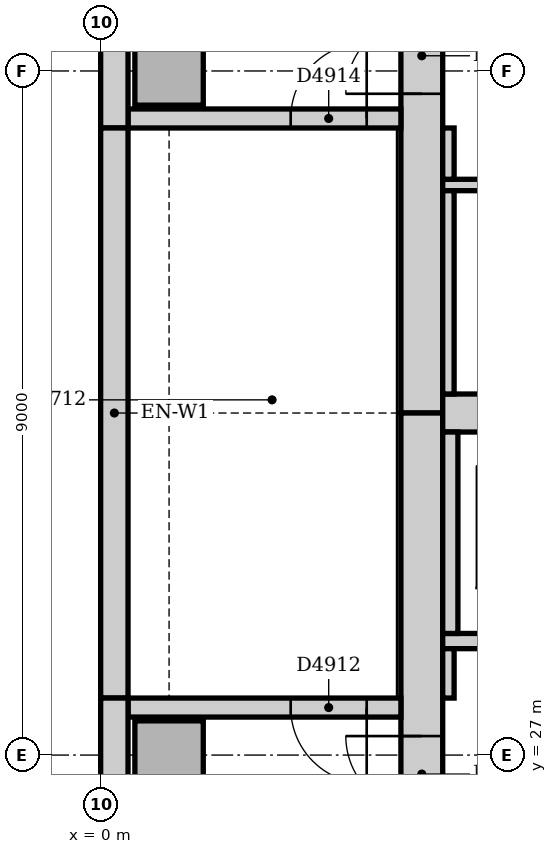
"""IFC4 building model, lengths in metres.
Left out: names, types, materials, properties, quantities, classifications, styles, units other than length and angle.
Written with IfcOpenShell. Run it as: python <this file> out.ifc"""

import sys

from ifc_helpers import new_model, si_unit, direction, frame, frame_2d, origin, origin_2d, place, context, subcontext, project, spatial, rectangle, extrude, element, fill, save


model = new_model("IFC4")
c1 = context("Model", 3, precision=1e-05, world=origin(), true_north=direction((0.0, 1.0)))
c2 = subcontext(c1, "Body", "Model", "MODEL_VIEW")
j1 = project(units=[si_unit("LENGTHUNIT", "METRE"), si_unit("PLANEANGLEUNIT", "RADIAN")], contexts=[c1])
p1 = place(None, origin())
s1 = spatial("IfcSite", under=j1, at=p1, CompositionType="ELEMENT")
p2 = place(p1, origin())
s2 = spatial("IfcBuilding", under=s1, at=p2, CompositionType="ELEMENT")
p3 = place(p2, frame((0.0, 0.0, 198.0)))
s3 = spatial("IfcBuildingStorey", under=s2, at=p3, CompositionType="ELEMENT", Elevation=198.0)
p4 = place(p3, frame((4.225, 42.0, 0.0), z_axis=(0.0, 0.0, 1.0), x_axis=(0.0, -1.0, 0.0)))
e1 = element("IfcWall", 1, at=p4, inside=s3, PredefinedType="SOLIDWALL", context=c2, shape_type="SweptSolid", body=[
    extrude(rectangle(XDim=10.5, YDim=0.55, at=frame_2d((5.25, 0.0))), origin(), (0.0, 0.0, 1.0), 4.0),
])
p5 = place(p4, frame((5.3, 0.0, 0.0)))
e2 = element("IfcOpeningElement", 2, at=p5, cuts=e1, PredefinedType="OPENING", context=c2, shape_type="SweptSolid", body=[
    extrude(rectangle(XDim=1.0, YDim=2.1, at=frame_2d((0.5, 1.05))), frame((0.0, 0.285, 0.0), z_axis=(0.0, -1.0, 0.0), x_axis=(1.0, 0.0, 0.0)), (0.0, 0.0, 1.0), 0.57),
])
p6 = place(p3, frame((4.225, 31.5, 0.0), z_axis=(0.0, 0.0, 1.0), x_axis=(0.0, -1.0, 0.0)))
e3 = element("IfcWall", 3, at=p6, inside=s3, PredefinedType="SOLIDWALL", context=c2, shape_type="SweptSolid", body=[
    extrude(rectangle(XDim=10.5, YDim=0.55, at=frame_2d((5.25, 0.0))), origin(), (0.0, 0.0, 1.0), 4.0),
])
p7 = place(p6, frame((4.25, 0.0, 0.0)))
e4 = element("IfcOpeningElement", 4, at=p7, cuts=e3, PredefinedType="OPENING", context=c2, shape_type="SweptSolid", body=[
    extrude(rectangle(XDim=1.0, YDim=2.1, at=frame_2d((0.5, 1.05))), frame((0.0, 0.285, 0.0), z_axis=(0.0, -1.0, 0.0), x_axis=(1.0, 0.0, 0.0)), (0.0, 0.0, 1.0), 0.57),
])
p8 = place(p3, frame((4.5, 31.5, 0.0), z_axis=(0.0, 0.0, 1.0), x_axis=(1.0, 0.0, 0.0)))
e5 = element("IfcWall", 5, at=p8, inside=s3, PredefinedType="SOLIDWALL", context=c2, shape_type="SweptSolid", body=[
    extrude(rectangle(XDim=18.0, YDim=0.5, at=frame_2d((9.0, 0.0))), origin(), (0.0, 0.0, 1.0), 4.0),
])
p9 = place(p3, frame((3.95, 27.625, 0.0), z_axis=(0.0, 0.0, 1.0), x_axis=(-1.0, 0.0, 0.0)))
e6 = element("IfcWall", 6, at=p9, inside=s3, PredefinedType="SOLIDWALL", context=c2, shape_type="SweptSolid", body=[
    extrude(rectangle(XDim=3.59, YDim=0.25, at=frame_2d((1.795, 0.0))), origin(), (0.0, 0.0, 1.0), 4.0),
])
p10 = place(p9, frame((0.45, 0.0, 0.0)))
e7 = element("IfcOpeningElement", 7, at=p10, cuts=e6, PredefinedType="OPENING", context=c2, shape_type="SweptSolid", body=[
    extrude(rectangle(XDim=1.0, YDim=2.1, at=frame_2d((0.5, 1.05))), frame((0.0, 0.135, 0.0), z_axis=(0.0, -1.0, 0.0), x_axis=(1.0, 0.0, 0.0)), (0.0, 0.0, 1.0), 0.27),
])
p11 = place(p3, frame((0.36, 35.375, 0.0), z_axis=(0.0, 0.0, 1.0), x_axis=(1.0, 0.0, 0.0)))
e8 = element("IfcWall", 8, at=p11, inside=s3, PredefinedType="SOLIDWALL", context=c2, shape_type="SweptSolid", body=[
    extrude(rectangle(XDim=3.59, YDim=0.25, at=frame_2d((1.795, 0.0))), origin(), (0.0, 0.0, 1.0), 4.0),
])
p12 = place(p11, frame((2.14, 0.0, 0.0)))
e9 = element("IfcOpeningElement", 9, at=p12, cuts=e8, PredefinedType="OPENING", context=c2, shape_type="SweptSolid", body=[
    extrude(rectangle(XDim=1.0, YDim=2.1, at=frame_2d((0.5, 1.05))), frame((0.0, 0.135, 0.0), z_axis=(0.0, -1.0, 0.0), x_axis=(1.0, 0.0, 0.0)), (0.0, 0.0, 1.0), 0.27),
])
for number, where, z_axis, x_axis in (
    (10, (0.9, 27.0, 0.0), (0.0, 0.0, 1.0), (1.0, 0.0, 0.0)),
    (11, (0.9, 36.0, 0.0), (0.0, 0.0, 1.0), (1.0, 0.0, 0.0)),
):
    element("IfcColumn", number, at=place(p3, frame(where, z_axis=z_axis, x_axis=x_axis)), inside=s3, PredefinedType="COLUMN", context=c2, shape_type="SweptSolid", body=[
        extrude(rectangle(XDim=0.9, YDim=0.9, at=origin_2d()), origin(), (0.0, 0.0, 1.0), 4.0),
    ])
p13 = place(p3, frame((0.18, 42.0, 0.0), z_axis=(0.0, 0.0, 1.0), x_axis=(0.0, -1.0, 0.0)))
e12 = element("IfcWall", 12, at=p13, inside=s3, PredefinedType="STANDARD", context=c2, shape_type="SweptSolid", body=[
    extrude(rectangle(XDim=6.75, YDim=0.36, at=frame_2d((3.375, 0.0))), origin(), (0.0, 0.0, 1.0), 3.85),
])
p14 = place(p3, frame((0.18, 35.25, 0.0), z_axis=(0.0, 0.0, 1.0), x_axis=(0.0, -1.0, 0.0)))
e13 = element("IfcWall", 13, at=p14, inside=s3, PredefinedType="STANDARD", context=c2, shape_type="SweptSolid", body=[
    extrude(rectangle(XDim=7.5, YDim=0.36, at=frame_2d((3.75, 0.0))), origin(), (0.0, 0.0, 1.0), 3.85),
])
p15 = place(p3, frame((0.18, 27.75, 0.0), z_axis=(0.0, 0.0, 1.0), x_axis=(0.0, -1.0, 0.0)))
e14 = element("IfcWall", 14, at=p15, inside=s3, PredefinedType="STANDARD", context=c2, shape_type="SweptSolid", body=[
    extrude(rectangle(XDim=6.75, YDim=0.36, at=frame_2d((3.375, 0.0))), origin(), (0.0, 0.0, 1.0), 3.85),
])
p16 = place(p3, frame((4.5, 28.5, 0.0), z_axis=(0.0, 0.0, 1.0), x_axis=(1.0, 0.0, 0.0)))
e15 = element("IfcWall", 15, at=p16, inside=s3, PredefinedType="PARTITIONING", context=c2, shape_type="SweptSolid", body=[
    extrude(rectangle(XDim=18.0, YDim=0.2, at=frame_2d((9.0, 0.0))), origin(), (0.0, 0.0, 1.0), 3.85),
])
p17 = place(p16, frame((0.95, 0.0, 0.0)))
e16 = element("IfcOpeningElement", 16, at=p17, cuts=e15, PredefinedType="OPENING", context=c2, shape_type="SweptSolid", body=[
    extrude(rectangle(XDim=1.1, YDim=2.1, at=frame_2d((0.55, 1.05))), frame((0.0, 0.11, 0.0), z_axis=(0.0, -1.0, 0.0), x_axis=(1.0, 0.0, 0.0)), (0.0, 0.0, 1.0), 0.22),
])
p18 = place(p16, frame((3.95, 0.0, 0.0)))
e17 = element("IfcOpeningElement", 17, at=p18, cuts=e15, PredefinedType="OPENING", context=c2, shape_type="SweptSolid", body=[
    extrude(rectangle(XDim=1.1, YDim=2.1, at=frame_2d((0.55, 1.05))), frame((0.0, 0.11, 0.0), z_axis=(0.0, -1.0, 0.0), x_axis=(1.0, 0.0, 0.0)), (0.0, 0.0, 1.0), 0.22),
])
p19 = place(p16, frame((6.95, 0.0, 0.0)))
e18 = element("IfcOpeningElement", 18, at=p19, cuts=e15, PredefinedType="OPENING", context=c2, shape_type="SweptSolid", body=[
    extrude(rectangle(XDim=1.1, YDim=2.1, at=frame_2d((0.55, 1.05))), frame((0.0, 0.11, 0.0), z_axis=(0.0, -1.0, 0.0), x_axis=(1.0, 0.0, 0.0)), (0.0, 0.0, 1.0), 0.22),
])
p20 = place(p16, frame((9.95, 0.0, 0.0)))
e19 = element("IfcOpeningElement", 19, at=p20, cuts=e15, PredefinedType="OPENING", context=c2, shape_type="SweptSolid", body=[
    extrude(rectangle(XDim=1.1, YDim=2.1, at=frame_2d((0.55, 1.05))), frame((0.0, 0.11, 0.0), z_axis=(0.0, -1.0, 0.0), x_axis=(1.0, 0.0, 0.0)), (0.0, 0.0, 1.0), 0.22),
])
p21 = place(p16, frame((12.95, 0.0, 0.0)))
e20 = element("IfcOpeningElement", 20, at=p21, cuts=e15, PredefinedType="OPENING", context=c2, shape_type="SweptSolid", body=[
    extrude(rectangle(XDim=1.1, YDim=2.1, at=frame_2d((0.55, 1.05))), frame((0.0, 0.11, 0.0), z_axis=(0.0, -1.0, 0.0), x_axis=(1.0, 0.0, 0.0)), (0.0, 0.0, 1.0), 0.22),
])
p22 = place(p16, frame((15.95, 0.0, 0.0)))
e21 = element("IfcOpeningElement", 21, at=p22, cuts=e15, PredefinedType="OPENING", context=c2, shape_type="SweptSolid", body=[
    extrude(rectangle(XDim=1.1, YDim=2.1, at=frame_2d((0.55, 1.05))), frame((0.0, 0.11, 0.0), z_axis=(0.0, -1.0, 0.0), x_axis=(1.0, 0.0, 0.0)), (0.0, 0.0, 1.0), 0.22),
])
p23 = place(p3, frame((4.6, 28.6, 0.0), z_axis=(0.0, 0.0, 1.0), x_axis=(0.0, 1.0, 0.0)))
e22 = element("IfcWall", 22, at=p23, inside=s3, PredefinedType="PARTITIONING", context=c2, shape_type="SweptSolid", body=[
    extrude(rectangle(XDim=2.65, YDim=0.2, at=frame_2d((1.325, 0.0))), origin(), (0.0, 0.0, 1.0), 3.85),
])
p24 = place(p3, frame((4.5, 34.5, 0.0), z_axis=(0.0, 0.0, 1.0), x_axis=(1.0, 0.0, 0.0)))
e23 = element("IfcWall", 23, at=p24, inside=s3, PredefinedType="PARTITIONING", context=c2, shape_type="SweptSolid", body=[
    extrude(rectangle(XDim=5.9, YDim=0.15, at=frame_2d((2.95, 0.0))), origin(), (0.0, 0.0, 1.0), 3.85),
])
p25 = place(p24, frame((2.5, 0.0, 0.0)))
e24 = element("IfcOpeningElement", 24, at=p25, cuts=e23, PredefinedType="OPENING", context=c2, shape_type="SweptSolid", body=[
    extrude(rectangle(XDim=0.9, YDim=2.1, at=frame_2d((0.45, 1.05))), frame((0.0, 0.085, 0.0), z_axis=(0.0, -1.0, 0.0), x_axis=(1.0, 0.0, 0.0)), (0.0, 0.0, 1.0), 0.17),
])
p26 = place(p3, frame((4.575, 34.575, 0.0), z_axis=(0.0, 0.0, 1.0), x_axis=(0.0, 1.0, 0.0)))
e25 = element("IfcWall", 25, at=p26, inside=s3, PredefinedType="PARTITIONING", context=c2, shape_type="SweptSolid", body=[
    extrude(rectangle(XDim=0.675, YDim=0.15, at=frame_2d((0.338, 0.0))), origin(), (0.0, 0.0, 1.0), 3.85),
])
p27 = place(p3, frame((4.575, 31.75, 0.0), z_axis=(0.0, 0.0, 1.0), x_axis=(0.0, 1.0, 0.0)))
e26 = element("IfcWall", 26, at=p27, inside=s3, PredefinedType="PARTITIONING", context=c2, shape_type="SweptSolid", body=[
    extrude(rectangle(XDim=2.675, YDim=0.15, at=frame_2d((1.337, 0.0))), origin(), (0.0, 0.0, 1.0), 3.85),
])
p28 = place(p3, frame((4.575, 27.75, 0.0), z_axis=(0.0, 0.0, 1.0), x_axis=(0.0, 1.0, 0.0)))
e27 = element("IfcWall", 27, at=p28, inside=s3, PredefinedType="PARTITIONING", context=c2, shape_type="SweptSolid", body=[
    extrude(rectangle(XDim=0.65, YDim=0.15, at=frame_2d((0.325, 0.0))), origin(), (0.0, 0.0, 1.0), 3.85),
])
p29 = place(p7, frame((1.0, 0.0, 0.0), z_axis=(0.0, 0.0, 1.0), x_axis=(-1.0, 0.0, 0.0)))
e28 = element("IfcDoor", 28, at=p29, inside=s3, OperationType="SINGLE_SWING_RIGHT", PredefinedType="DOOR", context=c2, shape_type="SweptSolid", body=[
    extrude(rectangle(XDim=1.0, YDim=2.1, at=frame_2d((0.5, 1.05))), frame((0.0, 0.025, 0.0), z_axis=(0.0, -1.0, 0.0), x_axis=(1.0, 0.0, 0.0)), (0.0, 0.0, 1.0), 0.05),
])
fill(e4, e28)
p30 = place(p10, origin())
e29 = element("IfcDoor", 29, at=p30, inside=s3, OperationType="SINGLE_SWING_LEFT", PredefinedType="DOOR", context=c2, shape_type="SweptSolid", body=[
    extrude(rectangle(XDim=1.0, YDim=2.1, at=frame_2d((0.5, 1.05))), frame((0.0, 0.025, 0.0), z_axis=(0.0, -1.0, 0.0), x_axis=(1.0, 0.0, 0.0)), (0.0, 0.0, 1.0), 0.05),
])
fill(e7, e29)
p31 = place(p5, frame((1.0, 0.0, 0.0), z_axis=(0.0, 0.0, 1.0), x_axis=(-1.0, 0.0, 0.0)))
e30 = element("IfcDoor", 30, at=p31, inside=s3, OperationType="SINGLE_SWING_LEFT", PredefinedType="DOOR", context=c2, shape_type="SweptSolid", body=[
    extrude(rectangle(XDim=1.0, YDim=2.1, at=frame_2d((0.5, 1.05))), frame((0.0, 0.025, 0.0), z_axis=(0.0, -1.0, 0.0), x_axis=(1.0, 0.0, 0.0)), (0.0, 0.0, 1.0), 0.05),
])
fill(e2, e30)
p32 = place(p12, origin())
e31 = element("IfcDoor", 31, at=p32, inside=s3, OperationType="SINGLE_SWING_RIGHT", PredefinedType="DOOR", context=c2, shape_type="SweptSolid", body=[
    extrude(rectangle(XDim=1.0, YDim=2.1, at=frame_2d((0.5, 1.05))), frame((0.0, 0.025, 0.0), z_axis=(0.0, -1.0, 0.0), x_axis=(1.0, 0.0, 0.0)), (0.0, 0.0, 1.0), 0.05),
])
fill(e9, e31)
save(model, sys.argv[1])
